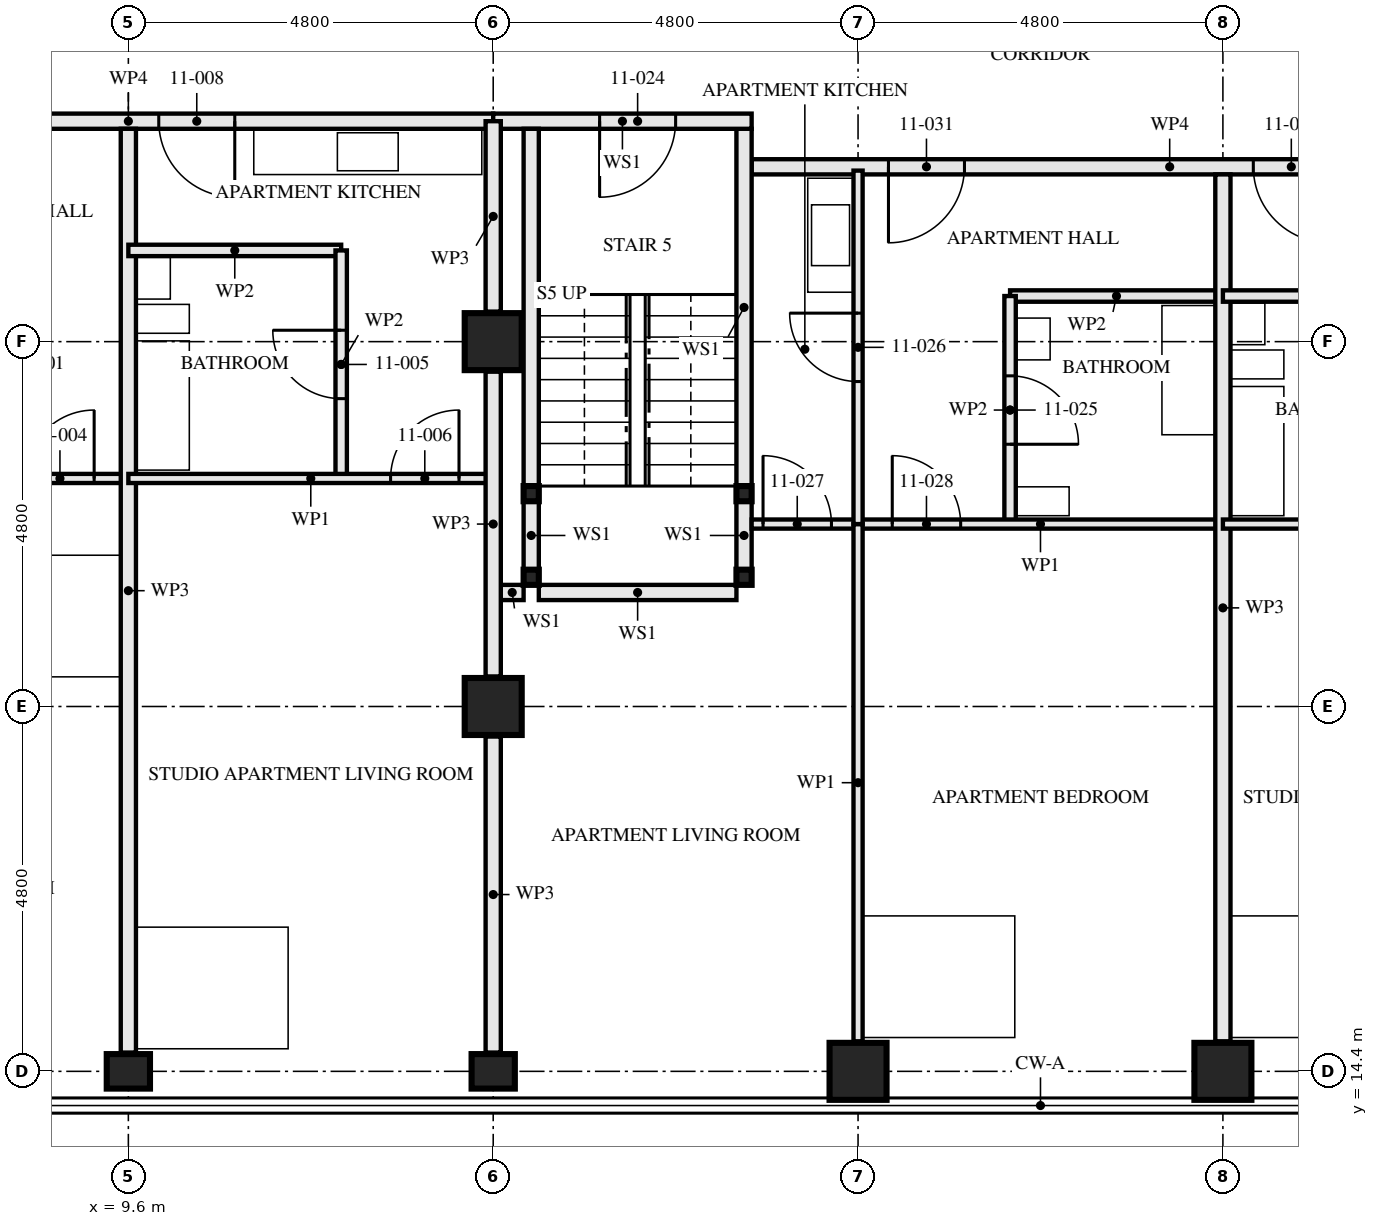
"""IFC4 building model, lengths in metres.
Left out: names, types, materials, properties, quantities, classifications, styles, units other than length and angle.
Written with IfcOpenShell. Run it as: python <this file> out.ifc"""

import sys

from ifc_helpers import new_model, si_unit, direction, frame, frame_2d, origin, origin_2d, place, context, subcontext, project, spatial, rectangle, hollow_rectangle, i_section, extrude, element, fill, save


model = new_model("IFC4")
c1 = context("Model", 3, precision=1e-05, world=origin(), true_north=direction((0.0, 1.0)))
c2 = subcontext(c1, "Body", "Model", "MODEL_VIEW")
j1 = project(units=[si_unit("LENGTHUNIT", "METRE"), si_unit("PLANEANGLEUNIT", "RADIAN")], contexts=[c1])
p1 = place(None, origin())
s1 = spatial("IfcSite", under=j1, at=p1, CompositionType="ELEMENT")
p2 = place(p1, origin())
s2 = spatial("IfcBuilding", under=s1, at=p2, CompositionType="ELEMENT")
p3 = place(p2, frame((0.0, 0.0, 44.5)))
s3 = spatial("IfcBuildingStorey", under=s2, at=p3, CompositionType="ELEMENT", Elevation=44.5)
for number, where, z_axis, x_axis in (
    (1, (9.6, 14.4, 0.0), (0.0, 0.0, 1.0), (0.0, 1.0, 0.0)),
    (2, (14.4, 14.4, 0.0), (0.0, 0.0, 1.0), (0.0, 1.0, 0.0)),
):
    element("IfcColumn", number, at=place(p3, frame(where, z_axis=z_axis, x_axis=x_axis)), inside=s3, PredefinedType="COLUMN", context=c2, shape_type="SweptSolid", body=[
        extrude(i_section(OverallWidth=0.454, OverallDepth=0.569, WebThickness=0.078, FlangeThickness=0.125, FilletRadius=0.015, at=origin_2d()), origin(), (0.0, 0.0, 1.0), 3.5),
    ])
for number, where, z_axis, x_axis in (
    (3, (14.4, 19.2, 0.0), (0.0, 0.0, 1.0), (1.0, 0.0, 0.0)),
    (4, (14.4, 24.0, 0.0), (0.0, 0.0, 1.0), (1.0, 0.0, 0.0)),
    (5, (19.2, 14.4, 0.0), (0.0, 0.0, 1.0), (0.0, 1.0, 0.0)),
    (6, (24.0, 14.4, 0.0), (0.0, 0.0, 1.0), (0.0, 1.0, 0.0)),
):
    element("IfcColumn", number, at=place(p3, frame(where, z_axis=z_axis, x_axis=x_axis)), inside=s3, PredefinedType="COLUMN", context=c2, shape_type="SweptSolid", body=[
        extrude(hollow_rectangle(XDim=0.75, YDim=0.75, WallThickness=0.08, at=origin_2d()), origin(), (0.0, 0.0, 1.0), 3.5),
    ])
for number, where, z_axis, x_axis in (
    (7, (14.9, 20.9, 0.0), (0.0, 0.0, 1.0), (1.0, 0.0, 0.0)),
    (8, (17.7, 20.9, 0.0), (0.0, 0.0, 1.0), (1.0, 0.0, 0.0)),
    (9, (14.9, 22.0, 0.0), (0.0, 0.0, 1.0), (1.0, 0.0, 0.0)),
    (10, (17.7, 22.0, 0.0), (0.0, 0.0, 1.0), (1.0, 0.0, 0.0)),
):
    element("IfcColumn", number, at=place(p3, frame(where, z_axis=z_axis, x_axis=x_axis)), inside=s3, PredefinedType="COLUMN", context=c2, shape_type="SweptSolid", body=[
        extrude(hollow_rectangle(XDim=0.2, YDim=0.2, WallThickness=0.008, at=origin_2d()), origin(), (0.0, 0.0, 1.0), 3.33),
    ])
p4 = place(p3, frame((4.8, 22.2, 0.0), z_axis=(0.0, 0.0, 1.0), x_axis=(1.0, 0.0, 0.0)))
e11 = element("IfcWall", 11, at=p4, inside=s3, PredefinedType="PARTITIONING", context=c2, shape_type="SweptSolid", body=[
    extrude(rectangle(XDim=4.8, YDim=0.12, at=frame_2d((2.4, 0.0))), origin(), (0.0, 0.0, 1.0), 3.33),
])
p5 = place(p4, frame((3.45, 0.0, 0.0)))
e12 = element("IfcOpeningElement", 12, at=p5, cuts=e11, PredefinedType="OPENING", context=c2, shape_type="SweptSolid", body=[
    extrude(rectangle(XDim=0.9, YDim=2.1, at=frame_2d((0.45, 1.05))), frame((0.0, 0.071, 0.0), z_axis=(0.0, -1.0, 0.0), x_axis=(1.0, 0.0, 0.0)), (0.0, 0.0, 1.0), 0.141),
])
p6 = place(p3, frame((9.6, 14.647, 0.0), z_axis=(0.0, 0.0, 1.0), x_axis=(0.0, 1.0, 0.0)))
e13 = element("IfcWall", 13, at=p6, inside=s3, PredefinedType="PARTITIONING", context=c2, shape_type="SweptSolid", body=[
    extrude(rectangle(XDim=12.153, YDim=0.2, at=frame_2d((6.077, 0.0))), origin(), (0.0, 0.0, 1.0), 2.55),
])
p7 = place(p3, frame((12.4, 22.2, 0.0), z_axis=(0.0, 0.0, 1.0), x_axis=(0.0, 1.0, 0.0)))
e14 = element("IfcWall", 14, at=p7, inside=s3, PredefinedType="PARTITIONING", context=c2, shape_type="SweptSolid", body=[
    extrude(rectangle(XDim=3.0, YDim=0.15, at=frame_2d((1.5, 0.0))), origin(), (0.0, 0.0, 1.0), 2.55),
])
p8 = place(p7, frame((1.05, 0.0, 0.0)))
e15 = element("IfcOpeningElement", 15, at=p8, cuts=e14, PredefinedType="OPENING", context=c2, shape_type="SweptSolid", body=[
    extrude(rectangle(XDim=0.9, YDim=2.1, at=frame_2d((0.45, 1.05))), frame((0.0, 0.085, 0.0), z_axis=(0.0, -1.0, 0.0), x_axis=(1.0, 0.0, 0.0)), (0.0, 0.0, 1.0), 0.171),
])
p9 = place(p3, frame((9.6, 25.2, 0.0), z_axis=(0.0, 0.0, 1.0), x_axis=(1.0, 0.0, 0.0)))
e16 = element("IfcWall", 16, at=p9, inside=s3, PredefinedType="PARTITIONING", context=c2, shape_type="SweptSolid", body=[
    extrude(rectangle(XDim=2.8, YDim=0.15, at=frame_2d((1.4, 0.0))), origin(), (0.0, 0.0, 1.0), 3.33),
])
p10 = place(p3, frame((9.6, 22.2, 0.0), z_axis=(0.0, 0.0, 1.0), x_axis=(1.0, 0.0, 0.0)))
e17 = element("IfcWall", 17, at=p10, inside=s3, PredefinedType="PARTITIONING", context=c2, shape_type="SweptSolid", body=[
    extrude(rectangle(XDim=4.8, YDim=0.12, at=frame_2d((2.4, 0.0))), origin(), (0.0, 0.0, 1.0), 3.33),
])
p11 = place(p10, frame((3.45, 0.0, 0.0)))
e18 = element("IfcOpeningElement", 18, at=p11, cuts=e17, PredefinedType="OPENING", context=c2, shape_type="SweptSolid", body=[
    extrude(rectangle(XDim=0.9, YDim=2.1, at=frame_2d((0.45, 1.05))), frame((0.0, 0.071, 0.0), z_axis=(0.0, -1.0, 0.0), x_axis=(1.0, 0.0, 0.0)), (0.0, 0.0, 1.0), 0.141),
])
p12 = place(p3, frame((4.8, 26.9, 0.0), z_axis=(0.0, 0.0, 1.0), x_axis=(1.0, 0.0, 0.0)))
e19 = element("IfcWall", 19, at=p12, inside=s3, PredefinedType="PARTITIONING", context=c2, shape_type="SweptSolid", body=[
    extrude(rectangle(XDim=9.6, YDim=0.2, at=frame_2d((4.8, 0.0))), origin(), (0.0, 0.0, 1.0), 3.33),
])
p13 = place(p12, frame((0.4, 0.0, 0.0)))
e20 = element("IfcOpeningElement", 20, at=p13, cuts=e19, PredefinedType="OPENING", context=c2, shape_type="SweptSolid", body=[
    extrude(rectangle(XDim=1.0, YDim=2.1, at=frame_2d((0.5, 1.05))), frame((0.0, 0.111, 0.0), z_axis=(0.0, -1.0, 0.0), x_axis=(1.0, 0.0, 0.0)), (0.0, 0.0, 1.0), 0.221),
])
p14 = place(p12, frame((5.2, 0.0, 0.0)))
e21 = element("IfcOpeningElement", 21, at=p14, cuts=e19, PredefinedType="OPENING", context=c2, shape_type="SweptSolid", body=[
    extrude(rectangle(XDim=1.0, YDim=2.1, at=frame_2d((0.5, 1.05))), frame((0.0, 0.111, 0.0), z_axis=(0.0, -1.0, 0.0), x_axis=(1.0, 0.0, 0.0)), (0.0, 0.0, 1.0), 0.221),
])
p15 = place(p3, frame((14.9, 21.0, 0.0), z_axis=(0.0, 0.0, 1.0), x_axis=(0.0, 1.0, 0.0)))
e22 = element("IfcWall", 22, at=p15, inside=s3, PredefinedType="SOLIDWALL", context=c2, shape_type="SweptSolid", body=[
    extrude(rectangle(XDim=0.9, YDim=0.2, at=frame_2d((0.45, 0.0))), origin(), (0.0, 0.0, 1.0), 2.99),
])
p16 = place(p3, frame((14.9, 22.1, 0.0), z_axis=(0.0, 0.0, 1.0), x_axis=(0.0, 1.0, 0.0)))
e23 = element("IfcWall", 23, at=p16, inside=s3, PredefinedType="SOLIDWALL", context=c2, shape_type="SweptSolid", body=[
    extrude(rectangle(XDim=4.7, YDim=0.2, at=frame_2d((2.35, 0.0))), origin(), (0.0, 0.0, 1.0), 2.99),
])
p17 = place(p3, frame((17.7, 21.0, 0.0), z_axis=(0.0, 0.0, 1.0), x_axis=(0.0, 1.0, 0.0)))
e24 = element("IfcWall", 24, at=p17, inside=s3, PredefinedType="SOLIDWALL", context=c2, shape_type="SweptSolid", body=[
    extrude(rectangle(XDim=0.9, YDim=0.2, at=frame_2d((0.45, 0.0))), origin(), (0.0, 0.0, 1.0), 2.99),
])
p18 = place(p3, frame((17.7, 22.1, 0.0), z_axis=(0.0, 0.0, 1.0), x_axis=(0.0, 1.0, 0.0)))
e25 = element("IfcWall", 25, at=p18, inside=s3, PredefinedType="SOLIDWALL", context=c2, shape_type="SweptSolid", body=[
    extrude(rectangle(XDim=4.7, YDim=0.2, at=frame_2d((2.35, 0.0))), origin(), (0.0, 0.0, 1.0), 2.99),
])
p19 = place(p3, frame((14.5, 20.7, 0.0), z_axis=(0.0, 0.0, 1.0), x_axis=(1.0, 0.0, 0.0)))
e26 = element("IfcWall", 26, at=p19, inside=s3, PredefinedType="SOLIDWALL", context=c2, shape_type="SweptSolid", body=[
    extrude(rectangle(XDim=0.3, YDim=0.2, at=frame_2d((0.15, 0.0))), origin(), (0.0, 0.0, 1.0), 3.33),
])
p20 = place(p3, frame((15.0, 20.7, 0.0), z_axis=(0.0, 0.0, 1.0), x_axis=(1.0, 0.0, 0.0)))
e27 = element("IfcWall", 27, at=p20, inside=s3, PredefinedType="SOLIDWALL", context=c2, shape_type="SweptSolid", body=[
    extrude(rectangle(XDim=2.6, YDim=0.2, at=frame_2d((1.3, 0.0))), origin(), (0.0, 0.0, 1.0), 3.33),
])
p21 = place(p3, frame((14.4, 26.9, 0.0), z_axis=(0.0, 0.0, 1.0), x_axis=(1.0, 0.0, 0.0)))
e28 = element("IfcWall", 28, at=p21, inside=s3, PredefinedType="SOLIDWALL", context=c2, shape_type="SweptSolid", body=[
    extrude(rectangle(XDim=3.4, YDim=0.2, at=frame_2d((1.7, 0.0))), origin(), (0.0, 0.0, 1.0), 3.33),
])
p22 = place(p21, frame((1.4, 0.0, 0.0)))
e29 = element("IfcOpeningElement", 29, at=p22, cuts=e28, PredefinedType="OPENING", context=c2, shape_type="SweptSolid", body=[
    extrude(rectangle(XDim=1.0, YDim=2.1, at=frame_2d((0.5, 1.05))), frame((0.0, 0.111, 0.0), z_axis=(0.0, -1.0, 0.0), x_axis=(1.0, 0.0, 0.0)), (0.0, 0.0, 1.0), 0.221),
])
p23 = place(p3, frame((21.2, 21.6, 0.0), z_axis=(0.0, 0.0, 1.0), x_axis=(0.0, 1.0, 0.0)))
e30 = element("IfcWall", 30, at=p23, inside=s3, PredefinedType="PARTITIONING", context=c2, shape_type="SweptSolid", body=[
    extrude(rectangle(XDim=3.0, YDim=0.15, at=frame_2d((1.5, 0.0))), origin(), (0.0, 0.0, 1.0), 2.55),
])
p24 = place(p23, frame((1.05, 0.0, 0.0)))
e31 = element("IfcOpeningElement", 31, at=p24, cuts=e30, PredefinedType="OPENING", context=c2, shape_type="SweptSolid", body=[
    extrude(rectangle(XDim=0.9, YDim=2.1, at=frame_2d((0.45, 1.05))), frame((0.0, 0.085, 0.0), z_axis=(0.0, -1.0, 0.0), x_axis=(1.0, 0.0, 0.0)), (0.0, 0.0, 1.0), 0.171),
])
p25 = place(p3, frame((21.2, 24.6, 0.0), z_axis=(0.0, 0.0, 1.0), x_axis=(1.0, 0.0, 0.0)))
e32 = element("IfcWall", 32, at=p25, inside=s3, PredefinedType="PARTITIONING", context=c2, shape_type="SweptSolid", body=[
    extrude(rectangle(XDim=2.8, YDim=0.15, at=frame_2d((1.4, 0.0))), origin(), (0.0, 0.0, 1.0), 3.33),
])
p26 = place(p3, frame((19.2, 21.6, 0.0), z_axis=(0.0, 0.0, 1.0), x_axis=(0.0, 1.0, 0.0)))
e33 = element("IfcWall", 33, at=p26, inside=s3, PredefinedType="PARTITIONING", context=c2, shape_type="SweptSolid", body=[
    extrude(rectangle(XDim=4.65, YDim=0.12, at=frame_2d((2.325, 0.0))), origin(), (0.0, 0.0, 1.0), 2.55),
])
p27 = place(p26, frame((1.875, 0.0, 0.0)))
e34 = element("IfcOpeningElement", 34, at=p27, cuts=e33, PredefinedType="OPENING", context=c2, shape_type="SweptSolid", body=[
    extrude(rectangle(XDim=0.9, YDim=2.1, at=frame_2d((0.45, 1.05))), frame((0.0, 0.071, 0.0), z_axis=(0.0, -1.0, 0.0), x_axis=(1.0, 0.0, 0.0)), (0.0, 0.0, 1.0), 0.141),
])
p28 = place(p3, frame((17.8, 21.6, 0.0), z_axis=(0.0, 0.0, 1.0), x_axis=(1.0, 0.0, 0.0)))
e35 = element("IfcWall", 35, at=p28, inside=s3, PredefinedType="PARTITIONING", context=c2, shape_type="SweptSolid", body=[
    extrude(rectangle(XDim=1.4, YDim=0.12, at=frame_2d((0.7, 0.0))), origin(), (0.0, 0.0, 1.0), 3.33),
])
p29 = place(p28, frame((0.15, 0.0, 0.0)))
e36 = element("IfcOpeningElement", 36, at=p29, cuts=e35, PredefinedType="OPENING", context=c2, shape_type="SweptSolid", body=[
    extrude(rectangle(XDim=0.9, YDim=2.1, at=frame_2d((0.45, 1.05))), frame((0.0, 0.071, 0.0), z_axis=(0.0, -1.0, 0.0), x_axis=(1.0, 0.0, 0.0)), (0.0, 0.0, 1.0), 0.141),
])
p30 = place(p3, frame((19.2, 21.6, 0.0), z_axis=(0.0, 0.0, 1.0), x_axis=(1.0, 0.0, 0.0)))
e37 = element("IfcWall", 37, at=p30, inside=s3, PredefinedType="PARTITIONING", context=c2, shape_type="SweptSolid", body=[
    extrude(rectangle(XDim=4.8, YDim=0.12, at=frame_2d((2.4, 0.0))), origin(), (0.0, 0.0, 1.0), 3.33),
])
p31 = place(p30, frame((0.45, 0.0, 0.0)))
e38 = element("IfcOpeningElement", 38, at=p31, cuts=e37, PredefinedType="OPENING", context=c2, shape_type="SweptSolid", body=[
    extrude(rectangle(XDim=0.9, YDim=2.1, at=frame_2d((0.45, 1.05))), frame((0.0, 0.071, 0.0), z_axis=(0.0, -1.0, 0.0), x_axis=(1.0, 0.0, 0.0)), (0.0, 0.0, 1.0), 0.141),
])
p32 = place(p3, frame((19.2, 14.795, 0.0), z_axis=(0.0, 0.0, 1.0), x_axis=(0.0, 1.0, 0.0)))
e39 = element("IfcWall", 39, at=p32, inside=s3, PredefinedType="PARTITIONING", context=c2, shape_type="SweptSolid", body=[
    extrude(rectangle(XDim=6.805, YDim=0.12, at=frame_2d((3.403, 0.0))), origin(), (0.0, 0.0, 1.0), 2.55),
])
p33 = place(p3, frame((24.0, 14.795, 0.0), z_axis=(0.0, 0.0, 1.0), x_axis=(0.0, 1.0, 0.0)))
e40 = element("IfcWall", 40, at=p33, inside=s3, PredefinedType="PARTITIONING", context=c2, shape_type="SweptSolid", body=[
    extrude(rectangle(XDim=11.405, YDim=0.2, at=frame_2d((5.703, 0.0))), origin(), (0.0, 0.0, 1.0), 2.55),
])
p34 = place(p3, frame((24.0, 24.6, 0.0), z_axis=(0.0, 0.0, 1.0), x_axis=(1.0, 0.0, 0.0)))
e41 = element("IfcWall", 41, at=p34, inside=s3, PredefinedType="PARTITIONING", context=c2, shape_type="SweptSolid", body=[
    extrude(rectangle(XDim=2.8, YDim=0.15, at=frame_2d((1.4, 0.0))), origin(), (0.0, 0.0, 1.0), 3.33),
])
p35 = place(p3, frame((24.0, 21.6, 0.0), z_axis=(0.0, 0.0, 1.0), x_axis=(1.0, 0.0, 0.0)))
e42 = element("IfcWall", 42, at=p35, inside=s3, PredefinedType="PARTITIONING", context=c2, shape_type="SweptSolid", body=[
    extrude(rectangle(XDim=4.8, YDim=0.12, at=frame_2d((2.4, 0.0))), origin(), (0.0, 0.0, 1.0), 3.33),
])
p36 = place(p35, frame((3.45, 0.0, 0.0)))
e43 = element("IfcOpeningElement", 43, at=p36, cuts=e42, PredefinedType="OPENING", context=c2, shape_type="SweptSolid", body=[
    extrude(rectangle(XDim=0.9, YDim=2.1, at=frame_2d((0.45, 1.05))), frame((0.0, 0.071, 0.0), z_axis=(0.0, -1.0, 0.0), x_axis=(1.0, 0.0, 0.0)), (0.0, 0.0, 1.0), 0.141),
])
p37 = place(p3, frame((17.8, 26.3, 0.0), z_axis=(0.0, 0.0, 1.0), x_axis=(1.0, 0.0, 0.0)))
e44 = element("IfcWall", 44, at=p37, inside=s3, PredefinedType="PARTITIONING", context=c2, shape_type="SweptSolid", body=[
    extrude(rectangle(XDim=11.0, YDim=0.2, at=frame_2d((5.5, 0.0))), origin(), (0.0, 0.0, 1.0), 2.55),
])
p38 = place(p37, frame((1.8, 0.0, 0.0)))
e45 = element("IfcOpeningElement", 45, at=p38, cuts=e44, PredefinedType="OPENING", context=c2, shape_type="SweptSolid", body=[
    extrude(rectangle(XDim=1.0, YDim=2.1, at=frame_2d((0.5, 1.05))), frame((0.0, 0.111, 0.0), z_axis=(0.0, -1.0, 0.0), x_axis=(1.0, 0.0, 0.0)), (0.0, 0.0, 1.0), 0.221),
])
p39 = place(p37, frame((6.6, 0.0, 0.0)))
e46 = element("IfcOpeningElement", 46, at=p39, cuts=e44, PredefinedType="OPENING", context=c2, shape_type="SweptSolid", body=[
    extrude(rectangle(XDim=1.0, YDim=2.1, at=frame_2d((0.5, 1.05))), frame((0.0, 0.111, 0.0), z_axis=(0.0, -1.0, 0.0), x_axis=(1.0, 0.0, 0.0)), (0.0, 0.0, 1.0), 0.221),
])
p40 = place(p3, frame((14.4, 14.647, 0.0), z_axis=(0.0, 0.0, 1.0), x_axis=(0.0, 1.0, 0.0)))
e47 = element("IfcWall", 47, at=p40, inside=s3, PredefinedType="PARTITIONING", context=c2, shape_type="SweptSolid", body=[
    extrude(rectangle(XDim=4.158, YDim=0.2, at=frame_2d((2.079, 0.0))), origin(), (0.0, 0.0, 1.0), 2.32),
])
p41 = place(p3, frame((14.4, 19.595, 0.0), z_axis=(0.0, 0.0, 1.0), x_axis=(0.0, 1.0, 0.0)))
e48 = element("IfcWall", 48, at=p41, inside=s3, PredefinedType="PARTITIONING", context=c2, shape_type="SweptSolid", body=[
    extrude(rectangle(XDim=4.01, YDim=0.2, at=frame_2d((2.005, 0.0))), origin(), (0.0, 0.0, 1.0), 2.32),
])
p42 = place(p3, frame((14.4, 24.395, 0.0), z_axis=(0.0, 0.0, 1.0), x_axis=(0.0, 1.0, 0.0)))
e49 = element("IfcWall", 49, at=p42, inside=s3, PredefinedType="PARTITIONING", context=c2, shape_type="SweptSolid", body=[
    extrude(rectangle(XDim=2.505, YDim=0.2, at=frame_2d((1.252, 0.0))), origin(), (0.0, 0.0, 1.0), 2.32),
])
p43 = place(p5, origin())
e50 = element("IfcDoor", 50, at=p43, inside=s3, OperationType="SINGLE_SWING_LEFT", PredefinedType="DOOR", context=c2, shape_type="SweptSolid", body=[
    extrude(rectangle(XDim=0.9, YDim=2.1, at=frame_2d((0.45, 1.05))), frame((0.0, 0.022, 0.0), z_axis=(0.0, -1.0, 0.0), x_axis=(1.0, 0.0, 0.0)), (0.0, 0.0, 1.0), 0.044),
])
fill(e12, e50)
p44 = place(p8, origin())
e51 = element("IfcDoor", 51, at=p44, inside=s3, OperationType="SINGLE_SWING_LEFT", PredefinedType="DOOR", context=c2, shape_type="SweptSolid", body=[
    extrude(rectangle(XDim=0.9, YDim=2.1, at=frame_2d((0.45, 1.05))), frame((0.0, 0.022, 0.0), z_axis=(0.0, -1.0, 0.0), x_axis=(1.0, 0.0, 0.0)), (0.0, 0.0, 1.0), 0.044),
])
fill(e15, e51)
p45 = place(p11, origin())
e52 = element("IfcDoor", 52, at=p45, inside=s3, OperationType="SINGLE_SWING_LEFT", PredefinedType="DOOR", context=c2, shape_type="SweptSolid", body=[
    extrude(rectangle(XDim=0.9, YDim=2.1, at=frame_2d((0.45, 1.05))), frame((0.0, 0.022, 0.0), z_axis=(0.0, -1.0, 0.0), x_axis=(1.0, 0.0, 0.0)), (0.0, 0.0, 1.0), 0.044),
])
fill(e18, e52)
p46 = place(p14, frame((1.0, 0.0, 0.0), z_axis=(0.0, 0.0, 1.0), x_axis=(-1.0, 0.0, 0.0)))
e53 = element("IfcDoor", 53, at=p46, inside=s3, OperationType="SINGLE_SWING_RIGHT", PredefinedType="DOOR", context=c2, shape_type="SweptSolid", body=[
    extrude(rectangle(XDim=1.0, YDim=2.1, at=frame_2d((0.5, 1.05))), frame((0.0, 0.027, 0.0), z_axis=(0.0, -1.0, 0.0), x_axis=(1.0, 0.0, 0.0)), (0.0, 0.0, 1.0), 0.054),
])
fill(e21, e53)
p47 = place(p22, frame((1.0, 0.0, 0.0), z_axis=(0.0, 0.0, 1.0), x_axis=(-1.0, 0.0, 0.0)))
e54 = element("IfcDoor", 54, at=p47, inside=s3, OperationType="SINGLE_SWING_LEFT", PredefinedType="DOOR", context=c2, shape_type="SweptSolid", body=[
    extrude(rectangle(XDim=1.0, YDim=2.1, at=frame_2d((0.5, 1.05))), frame((0.0, 0.032, 0.0), z_axis=(0.0, -1.0, 0.0), x_axis=(1.0, 0.0, 0.0)), (0.0, 0.0, 1.0), 0.064),
])
fill(e29, e54)
p48 = place(p24, frame((0.9, 0.0, 0.0), z_axis=(0.0, 0.0, 1.0), x_axis=(-1.0, 0.0, 0.0)))
e55 = element("IfcDoor", 55, at=p48, inside=s3, OperationType="SINGLE_SWING_LEFT", PredefinedType="DOOR", context=c2, shape_type="SweptSolid", body=[
    extrude(rectangle(XDim=0.9, YDim=2.1, at=frame_2d((0.45, 1.05))), frame((0.0, 0.022, 0.0), z_axis=(0.0, -1.0, 0.0), x_axis=(1.0, 0.0, 0.0)), (0.0, 0.0, 1.0), 0.044),
])
fill(e31, e55)
p49 = place(p27, origin())
e56 = element("IfcDoor", 56, at=p49, inside=s3, OperationType="SINGLE_SWING_LEFT", PredefinedType="DOOR", context=c2, shape_type="SweptSolid", body=[
    extrude(rectangle(XDim=0.9, YDim=2.1, at=frame_2d((0.45, 1.05))), frame((0.0, 0.022, 0.0), z_axis=(0.0, -1.0, 0.0), x_axis=(1.0, 0.0, 0.0)), (0.0, 0.0, 1.0), 0.044),
])
fill(e34, e56)
p50 = place(p29, origin())
e57 = element("IfcDoor", 57, at=p50, inside=s3, OperationType="SINGLE_SWING_RIGHT", PredefinedType="DOOR", context=c2, shape_type="SweptSolid", body=[
    extrude(rectangle(XDim=0.9, YDim=2.1, at=frame_2d((0.45, 1.05))), frame((0.0, 0.022, 0.0), z_axis=(0.0, -1.0, 0.0), x_axis=(1.0, 0.0, 0.0)), (0.0, 0.0, 1.0), 0.044),
])
fill(e36, e57)
p51 = place(p31, origin())
e58 = element("IfcDoor", 58, at=p51, inside=s3, OperationType="SINGLE_SWING_RIGHT", PredefinedType="DOOR", context=c2, shape_type="SweptSolid", body=[
    extrude(rectangle(XDim=0.9, YDim=2.1, at=frame_2d((0.45, 1.05))), frame((0.0, 0.022, 0.0), z_axis=(0.0, -1.0, 0.0), x_axis=(1.0, 0.0, 0.0)), (0.0, 0.0, 1.0), 0.044),
])
fill(e38, e58)
p52 = place(p38, frame((1.0, 0.0, 0.0), z_axis=(0.0, 0.0, 1.0), x_axis=(-1.0, 0.0, 0.0)))
e59 = element("IfcDoor", 59, at=p52, inside=s3, OperationType="SINGLE_SWING_LEFT", PredefinedType="DOOR", context=c2, shape_type="SweptSolid", body=[
    extrude(rectangle(XDim=1.0, YDim=2.1, at=frame_2d((0.5, 1.05))), frame((0.0, 0.027, 0.0), z_axis=(0.0, -1.0, 0.0), x_axis=(1.0, 0.0, 0.0)), (0.0, 0.0, 1.0), 0.054),
])
fill(e45, e59)
p53 = place(p39, frame((1.0, 0.0, 0.0), z_axis=(0.0, 0.0, 1.0), x_axis=(-1.0, 0.0, 0.0)))
e60 = element("IfcDoor", 60, at=p53, inside=s3, OperationType="SINGLE_SWING_RIGHT", PredefinedType="DOOR", context=c2, shape_type="SweptSolid", body=[
    extrude(rectangle(XDim=1.0, YDim=2.1, at=frame_2d((0.5, 1.05))), frame((0.0, 0.027, 0.0), z_axis=(0.0, -1.0, 0.0), x_axis=(1.0, 0.0, 0.0)), (0.0, 0.0, 1.0), 0.054),
])
fill(e46, e60)
save(model, sys.argv[1])
